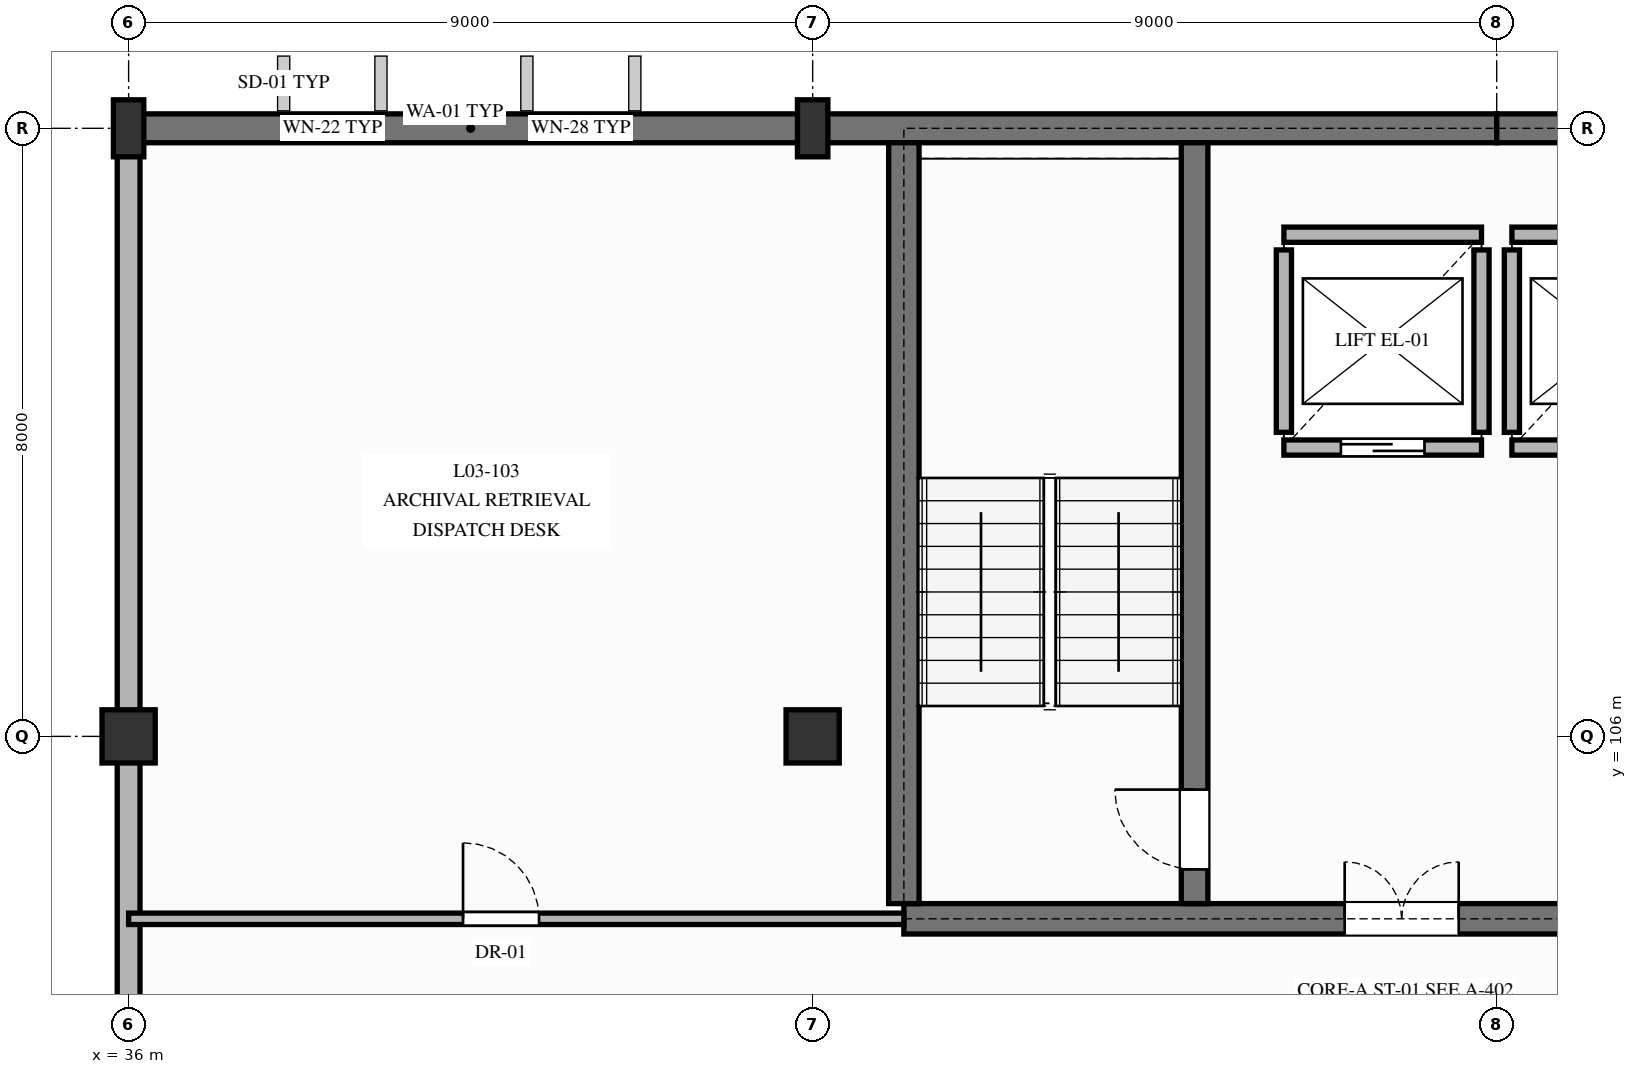
"""IFC4 building model, lengths in metres.
Left out: names, types, materials, properties, quantities, classifications, styles, units other than length and angle.
Written with IfcOpenShell. Run it as: python <this file> out.ifc"""

import sys

from ifc_helpers import new_model, si_unit, direction, frame, frame_2d, origin, origin_2d, place, context, subcontext, project, spatial, rectangle, extrude, element, fill, save


model = new_model("IFC4")
c1 = context("Model", 3, precision=1e-05, world=origin(), true_north=direction((0.0, 1.0)))
c2 = subcontext(c1, "Body", "Model", "MODEL_VIEW")
j1 = project(units=[si_unit("LENGTHUNIT", "METRE"), si_unit("PLANEANGLEUNIT", "RADIAN")], contexts=[c1])
p1 = place(None, origin())
s1 = spatial("IfcSite", under=j1, at=p1, CompositionType="ELEMENT")
p2 = place(p1, origin())
s2 = spatial("IfcBuilding", under=s1, at=p2, CompositionType="ELEMENT")
p3 = place(p2, frame((0.0, 0.0, 12.78)))
s3 = spatial("IfcBuildingStorey", under=s2, at=p3, CompositionType="ELEMENT", Elevation=12.78)
p4 = place(p3, frame((36.0, 106.0, 0.0), z_axis=(0.0, 0.0, 1.0), x_axis=(1.0, 0.0, 0.0)))
e1 = element("IfcColumn", 1, at=p4, inside=s3, PredefinedType="COLUMN", context=c2, shape_type="SweptSolid", body=[
    extrude(rectangle(XDim=0.7, YDim=0.7, at=origin_2d()), origin(), (0.0, 0.0, 1.0), 3.74),
])
p5 = place(p3, frame((36.0, 114.0, 0.0), z_axis=(0.0, 0.0, 1.0), x_axis=(0.0, 1.0, 0.0)))
e2 = element("IfcColumn", 2, at=p5, inside=s3, PredefinedType="COLUMN", context=c2, shape_type="SweptSolid", body=[
    extrude(rectangle(XDim=0.4, YDim=0.75, at=origin_2d()), origin(), (0.0, 0.0, 1.0), 3.74),
])
p6 = place(p3, frame((45.0, 106.0, 0.0), z_axis=(0.0, 0.0, 1.0), x_axis=(1.0, 0.0, 0.0)))
e3 = element("IfcColumn", 3, at=p6, inside=s3, PredefinedType="COLUMN", context=c2, shape_type="SweptSolid", body=[
    extrude(rectangle(XDim=0.7, YDim=0.7, at=origin_2d()), origin(), (0.0, 0.0, 1.0), 3.74),
])
p7 = place(p3, frame((45.0, 114.0, 0.0), z_axis=(0.0, 0.0, 1.0), x_axis=(0.0, 1.0, 0.0)))
e4 = element("IfcColumn", 4, at=p7, inside=s3, PredefinedType="COLUMN", context=c2, shape_type="SweptSolid", body=[
    extrude(rectangle(XDim=0.4, YDim=0.75, at=origin_2d()), origin(), (0.0, 0.0, 1.0), 3.74),
])
p8 = place(p3, frame((36.0, 114.0, 0.0), z_axis=(0.0, 0.0, 1.0), x_axis=(1.0, 0.0, 0.0)))
e5 = element("IfcWall", 5, at=p8, inside=s3, PredefinedType="SOLIDWALL", context=c2, shape_type="SweptSolid", body=[
    extrude(rectangle(XDim=9.0, YDim=0.38, at=frame_2d((4.5, 0.0))), origin(), (0.0, 0.0, 1.0), 3.42),
])
p9 = place(p8, frame((2.2, 0.0, 0.715)))
e6 = element("IfcOpeningElement", 6, at=p9, cuts=e5, PredefinedType="OPENING", context=c2, shape_type="SweptSolid", body=[
    extrude(rectangle(XDim=0.96, YDim=1.95, at=frame_2d((0.48, 0.975))), frame((0.0, 0.2, 0.0), z_axis=(0.0, -1.0, 0.0), x_axis=(1.0, 0.0, 0.0)), (0.0, 0.0, 1.0), 0.4),
])
p10 = place(p8, frame((5.4, 0.0, 1.015)))
e7 = element("IfcOpeningElement", 7, at=p10, cuts=e5, PredefinedType="OPENING", context=c2, shape_type="SweptSolid", body=[
    extrude(rectangle(XDim=1.1, YDim=1.65, at=frame_2d((0.55, 0.825))), frame((0.0, 0.2, 0.0), z_axis=(0.0, -1.0, 0.0), x_axis=(1.0, 0.0, 0.0)), (0.0, 0.0, 1.0), 0.4),
])
for number, where, z_axis, x_axis in (
    (8, (45.0, 114.0, 0.0), (0.0, 0.0, 1.0), (1.0, 0.0, 0.0)),
    (9, (54.0, 114.0, 0.0), (0.0, 0.0, 1.0), (1.0, 0.0, 0.0)),
):
    element("IfcWall", number, at=place(p3, frame(where, z_axis=z_axis, x_axis=x_axis)), inside=s3, PredefinedType="SOLIDWALL", context=c2, shape_type="SweptSolid", body=[
        extrude(rectangle(XDim=9.0, YDim=0.38, at=frame_2d((4.5, 0.0))), origin(), (0.0, 0.0, 1.0), 3.42),
    ])
p11 = place(p3, frame((36.0, 82.2, 0.0), z_axis=(0.0, 0.0, 1.0), x_axis=(0.0, 1.0, 0.0)))
e10 = element("IfcWall", 10, at=p11, inside=s3, PredefinedType="SOLIDWALL", context=c2, shape_type="SweptSolid", body=[
    extrude(rectangle(XDim=31.8, YDim=0.3, at=frame_2d((15.9, 0.0))), origin(), (0.0, 0.0, 1.0), 2.705),
])
p12 = place(p11, frame((3.0, 0.0, 0.735)))
e11 = element("IfcOpeningElement", 11, at=p12, cuts=e10, PredefinedType="OPENING", context=c2, shape_type="SweptSolid", body=[
    extrude(rectangle(XDim=1.35, YDim=1.85, at=frame_2d((0.675, 0.925))), frame((0.0, 0.16, 0.0), z_axis=(0.0, -1.0, 0.0), x_axis=(1.0, 0.0, 0.0)), (0.0, 0.0, 1.0), 0.32),
])
p13 = place(p11, frame((9.5, 0.0, 0.835)))
e12 = element("IfcOpeningElement", 12, at=p13, cuts=e10, PredefinedType="OPENING", context=c2, shape_type="SweptSolid", body=[
    extrude(rectangle(XDim=1.05, YDim=1.75, at=frame_2d((0.525, 0.875))), frame((0.0, 0.16, 0.0), z_axis=(0.0, -1.0, 0.0), x_axis=(1.0, 0.0, 0.0)), (0.0, 0.0, 1.0), 0.32),
])
p14 = place(p11, frame((16.5, 0.0, 0.485)))
e13 = element("IfcOpeningElement", 13, at=p14, cuts=e10, PredefinedType="OPENING", context=c2, shape_type="SweptSolid", body=[
    extrude(rectangle(XDim=1.5, YDim=2.1, at=frame_2d((0.75, 1.05))), frame((0.0, 0.16, 0.0), z_axis=(0.0, -1.0, 0.0), x_axis=(1.0, 0.0, 0.0)), (0.0, 0.0, 1.0), 0.32),
])
p15 = place(p3, frame((46.2, 103.6, 0.0), z_axis=(0.0, 0.0, 1.0), x_axis=(1.0, 0.0, 0.0)))
e14 = element("IfcWall", 14, at=p15, inside=s3, PredefinedType="SHEAR", context=c2, shape_type="SweptSolid", body=[
    extrude(rectangle(XDim=13.2, YDim=0.4, at=frame_2d((6.6, 0.0))), origin(), (0.0, 0.0, 1.0), 3.42),
])
p16 = place(p15, frame((5.8, 0.0, 0.0)))
e15 = element("IfcOpeningElement", 15, at=p16, cuts=e14, PredefinedType="OPENING", context=c2, shape_type="SweptSolid", body=[
    extrude(rectangle(XDim=1.5, YDim=2.2, at=frame_2d((0.75, 1.1))), frame((0.0, 0.21, 0.0), z_axis=(0.0, -1.0, 0.0), x_axis=(1.0, 0.0, 0.0)), (0.0, 0.0, 1.0), 0.42),
])
p17 = place(p3, frame((46.2, 103.8, 0.0), z_axis=(0.0, 0.0, 1.0), x_axis=(0.0, 1.0, 0.0)))
e16 = element("IfcWall", 16, at=p17, inside=s3, PredefinedType="SHEAR", context=c2, shape_type="SweptSolid", body=[
    extrude(rectangle(XDim=10.01, YDim=0.4, at=frame_2d((5.005, 0.0))), origin(), (0.0, 0.0, 1.0), 3.42),
])
p18 = place(p3, frame((50.025, 103.8, 0.0), z_axis=(0.0, 0.0, 1.0), x_axis=(0.0, 1.0, 0.0)))
e17 = element("IfcWall", 17, at=p18, inside=s3, PredefinedType="SHEAR", context=c2, shape_type="SweptSolid", body=[
    extrude(rectangle(XDim=10.01, YDim=0.35, at=frame_2d((5.005, 0.0))), origin(), (0.0, 0.0, 1.0), 3.42),
])
p19 = place(p18, frame((0.45, 0.0, 0.0)))
e18 = element("IfcOpeningElement", 18, at=p19, cuts=e17, PredefinedType="OPENING", context=c2, shape_type="SweptSolid", body=[
    extrude(rectangle(XDim=1.05, YDim=2.2, at=frame_2d((0.525, 1.1))), frame((0.0, 0.185, 0.0), z_axis=(0.0, -1.0, 0.0), x_axis=(1.0, 0.0, 0.0)), (0.0, 0.0, 1.0), 0.37),
])
p20 = place(p3, frame((51.2, 109.8, 0.0), z_axis=(0.0, 0.0, 1.0), x_axis=(1.0, 0.0, 0.0)))
e19 = element("IfcWall", 19, at=p20, inside=s3, PredefinedType="PARTITIONING", context=c2, shape_type="SweptSolid", body=[
    extrude(rectangle(XDim=2.6, YDim=0.2, at=frame_2d((1.3, 0.0))), origin(), (0.0, 0.0, 1.0), 3.42),
])
p21 = place(p20, frame((0.75, 0.0, 0.0)))
e20 = element("IfcOpeningElement", 20, at=p21, cuts=e19, PredefinedType="OPENING", context=c2, shape_type="SweptSolid", body=[
    extrude(rectangle(XDim=1.1, YDim=2.15, at=frame_2d((0.55, 1.075))), frame((0.0, 0.11, 0.0), z_axis=(0.0, -1.0, 0.0), x_axis=(1.0, 0.0, 0.0)), (0.0, 0.0, 1.0), 0.22),
])
p22 = place(p3, frame((51.2, 112.6, 0.0), z_axis=(0.0, 0.0, 1.0), x_axis=(1.0, 0.0, 0.0)))
e21 = element("IfcWall", 21, at=p22, inside=s3, PredefinedType="PARTITIONING", context=c2, shape_type="SweptSolid", body=[
    extrude(rectangle(XDim=2.6, YDim=0.2, at=frame_2d((1.3, 0.0))), origin(), (0.0, 0.0, 1.0), 3.42),
])
for number, where, z_axis, x_axis in (
    (22, (51.2, 110.0, 0.0), (0.0, 0.0, 1.0), (0.0, 1.0, 0.0)),
    (23, (53.8, 110.0, 0.0), (0.0, 0.0, 1.0), (0.0, 1.0, 0.0)),
):
    element("IfcWall", number, at=place(p3, frame(where, z_axis=z_axis, x_axis=x_axis)), inside=s3, PredefinedType="PARTITIONING", context=c2, shape_type="SweptSolid", body=[
        extrude(rectangle(XDim=2.4, YDim=0.2, at=frame_2d((1.2, 0.0))), origin(), (0.0, 0.0, 1.0), 3.42),
    ])
p23 = place(p3, frame((54.2, 109.8, 0.0), z_axis=(0.0, 0.0, 1.0), x_axis=(1.0, 0.0, 0.0)))
e24 = element("IfcWall", 24, at=p23, inside=s3, PredefinedType="PARTITIONING", context=c2, shape_type="SweptSolid", body=[
    extrude(rectangle(XDim=2.6, YDim=0.2, at=frame_2d((1.3, 0.0))), origin(), (0.0, 0.0, 1.0), 3.42),
])
p24 = place(p23, frame((0.75, 0.0, 0.0)))
e25 = element("IfcOpeningElement", 25, at=p24, cuts=e24, PredefinedType="OPENING", context=c2, shape_type="SweptSolid", body=[
    extrude(rectangle(XDim=1.1, YDim=2.15, at=frame_2d((0.55, 1.075))), frame((0.0, 0.11, 0.0), z_axis=(0.0, -1.0, 0.0), x_axis=(1.0, 0.0, 0.0)), (0.0, 0.0, 1.0), 0.22),
])
p25 = place(p3, frame((54.2, 112.6, 0.0), z_axis=(0.0, 0.0, 1.0), x_axis=(1.0, 0.0, 0.0)))
e26 = element("IfcWall", 26, at=p25, inside=s3, PredefinedType="PARTITIONING", context=c2, shape_type="SweptSolid", body=[
    extrude(rectangle(XDim=2.6, YDim=0.2, at=frame_2d((1.3, 0.0))), origin(), (0.0, 0.0, 1.0), 3.42),
])
p26 = place(p3, frame((54.2, 110.0, 0.0), z_axis=(0.0, 0.0, 1.0), x_axis=(0.0, 1.0, 0.0)))
e27 = element("IfcWall", 27, at=p26, inside=s3, PredefinedType="PARTITIONING", context=c2, shape_type="SweptSolid", body=[
    extrude(rectangle(XDim=2.4, YDim=0.2, at=frame_2d((1.2, 0.0))), origin(), (0.0, 0.0, 1.0), 3.42),
])
p27 = place(p3, frame((36.0, 103.6, 0.0), z_axis=(0.0, 0.0, 1.0), x_axis=(1.0, 0.0, 0.0)))
e28 = element("IfcWall", 28, at=p27, inside=s3, PredefinedType="PARTITIONING", context=c2, shape_type="SweptSolid", body=[
    extrude(rectangle(XDim=10.2, YDim=0.15, at=frame_2d((5.1, 0.0))), origin(), (0.0, 0.0, 1.0), 3.42),
])
p28 = place(p27, frame((4.4, 0.0, 0.0)))
e29 = element("IfcOpeningElement", 29, at=p28, cuts=e28, PredefinedType="OPENING", context=c2, shape_type="SweptSolid", body=[
    extrude(rectangle(XDim=1.0, YDim=2.15, at=frame_2d((0.5, 1.075))), frame((0.0, 0.085, 0.0), z_axis=(0.0, -1.0, 0.0), x_axis=(1.0, 0.0, 0.0)), (0.0, 0.0, 1.0), 0.17),
])
p29 = place(p9, origin())
e30 = element("IfcWindow", 30, at=p29, inside=s3, PartitioningType="SINGLE_PANEL", PredefinedType="WINDOW", context=c2, shape_type="SweptSolid", body=[
    extrude(rectangle(XDim=0.96, YDim=1.95, at=frame_2d((0.48, 0.975))), frame((0.0, 0.03, 0.0), z_axis=(0.0, -1.0, 0.0), x_axis=(1.0, 0.0, 0.0)), (0.0, 0.0, 1.0), 0.06),
])
fill(e6, e30)
p30 = place(p10, origin())
e31 = element("IfcWindow", 31, at=p30, inside=s3, PartitioningType="SINGLE_PANEL", PredefinedType="WINDOW", context=c2, shape_type="SweptSolid", body=[
    extrude(rectangle(XDim=1.1, YDim=1.65, at=frame_2d((0.55, 0.825))), frame((0.0, 0.03, 0.0), z_axis=(0.0, -1.0, 0.0), x_axis=(1.0, 0.0, 0.0)), (0.0, 0.0, 1.0), 0.06),
])
fill(e7, e31)
p31 = place(p16, origin())
e32 = element("IfcDoor", 32, at=p31, inside=s3, OperationType="DOUBLE_DOOR_SINGLE_SWING", PredefinedType="DOOR", context=c2, shape_type="SweptSolid", body=[
    extrude(rectangle(XDim=1.5, YDim=2.2, at=frame_2d((0.75, 1.1))), frame((0.0, 0.025, 0.0), z_axis=(0.0, -1.0, 0.0), x_axis=(1.0, 0.0, 0.0)), (0.0, 0.0, 1.0), 0.05),
])
fill(e15, e32)
p32 = place(p19, origin())
e33 = element("IfcDoor", 33, at=p32, inside=s3, OperationType="SINGLE_SWING_RIGHT", PredefinedType="DOOR", context=c2, shape_type="SweptSolid", body=[
    extrude(rectangle(XDim=1.05, YDim=2.2, at=frame_2d((0.525, 1.1))), frame((0.0, 0.025, 0.0), z_axis=(0.0, -1.0, 0.0), x_axis=(1.0, 0.0, 0.0)), (0.0, 0.0, 1.0), 0.05),
])
fill(e18, e33)
p33 = place(p21, origin())
e34 = element("IfcDoor", 34, at=p33, inside=s3, OperationType="SLIDING_TO_LEFT", PredefinedType="DOOR", context=c2, shape_type="SweptSolid", body=[
    extrude(rectangle(XDim=1.1, YDim=2.15, at=frame_2d((0.55, 1.075))), frame((0.0, 0.025, 0.0), z_axis=(0.0, -1.0, 0.0), x_axis=(1.0, 0.0, 0.0)), (0.0, 0.0, 1.0), 0.05),
])
fill(e20, e34)
p34 = place(p28, origin())
e35 = element("IfcDoor", 35, at=p34, inside=s3, OperationType="SINGLE_SWING_LEFT", PredefinedType="DOOR", context=c2, shape_type="SweptSolid", body=[
    extrude(rectangle(XDim=1.0, YDim=2.15, at=frame_2d((0.5, 1.075))), frame((0.0, 0.025, 0.0), z_axis=(0.0, -1.0, 0.0), x_axis=(1.0, 0.0, 0.0)), (0.0, 0.0, 1.0), 0.05),
])
fill(e29, e35)
save(model, sys.argv[1])
